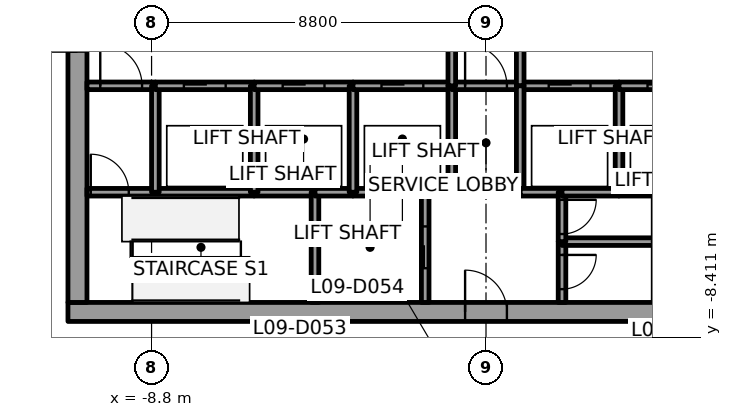
"""IFC4 building model, lengths in metres.
Left out: names, types, materials, properties, quantities, classifications, styles, units other than length and angle.
Written with IfcOpenShell. Run it as: python <this file> out.ifc"""

import sys

from ifc_helpers import new_model, si_unit, direction, frame, frame_2d, origin, place, context, subcontext, project, spatial, rectangle, extrude, element, fill, save


model = new_model("IFC4")
c1 = context("Model", 3, precision=1e-05, world=origin(), true_north=direction((0.0, 1.0)))
c2 = subcontext(c1, "Body", "Model", "MODEL_VIEW")
j1 = project(units=[si_unit("LENGTHUNIT", "METRE"), si_unit("PLANEANGLEUNIT", "RADIAN")], contexts=[c1])
p1 = place(None, origin())
s1 = spatial("IfcSite", under=j1, at=p1, CompositionType="ELEMENT")
p2 = place(p1, origin())
s2 = spatial("IfcBuilding", under=s1, at=p2, CompositionType="ELEMENT")
p3 = place(p2, frame((0.0, 0.0, 55.4)))
s3 = spatial("IfcBuildingStorey", under=s2, at=p3, CompositionType="ELEMENT", Elevation=55.4)
p4 = place(p3, frame((-11.0, -7.75, 0.0), z_axis=(0.0, 0.0, 1.0), x_axis=(1.0, 0.0, 0.0)))
e1 = element("IfcWall", 1, at=p4, inside=s3, PredefinedType="SHEAR", context=c2, shape_type="SweptSolid", body=[
    extrude(rectangle(XDim=22.0, YDim=0.5, at=frame_2d((11.0, 0.0))), origin(), (0.0, 0.0, 1.0), 3.7),
])
p5 = place(p4, frame((10.45, 0.0, 0.0)))
e2 = element("IfcOpeningElement", 2, at=p5, cuts=e1, PredefinedType="OPENING", context=c2, shape_type="SweptSolid", body=[
    extrude(rectangle(XDim=1.1, YDim=2.1, at=frame_2d((0.55, 1.05))), frame((0.0, 0.25, 0.0), z_axis=(0.0, -1.0, 0.0), x_axis=(1.0, 0.0, 0.0)), (0.0, 0.0, 1.0), 0.5),
])
p6 = place(p3, frame((-10.75, -7.5, 0.0), z_axis=(0.0, 0.0, 1.0), x_axis=(0.0, 1.0, 0.0)))
e3 = element("IfcWall", 3, at=p6, inside=s3, PredefinedType="SHEAR", context=c2, shape_type="SweptSolid", body=[
    extrude(rectangle(XDim=15.0, YDim=0.5, at=frame_2d((7.5, 0.0))), origin(), (0.0, 0.0, 1.0), 3.7),
])
p7 = place(p6, frame((6.6, 0.0, 0.0)))
e4 = element("IfcOpeningElement", 4, at=p7, cuts=e3, PredefinedType="OPENING", context=c2, shape_type="SweptSolid", body=[
    extrude(rectangle(XDim=1.8, YDim=2.1, at=frame_2d((0.9, 1.05))), frame((0.0, 0.25, 0.0), z_axis=(0.0, -1.0, 0.0), x_axis=(1.0, 0.0, 0.0)), (0.0, 0.0, 1.0), 0.5),
])
p8 = place(p3, frame((-10.5, -4.6, 0.0), z_axis=(0.0, 0.0, 1.0), x_axis=(1.0, 0.0, 0.0)))
e5 = element("IfcWall", 5, at=p8, inside=s3, PredefinedType="SOLIDWALL", context=c2, shape_type="SweptSolid", body=[
    extrude(rectangle(XDim=1.8, YDim=0.2, at=frame_2d((0.9, 0.0))), origin(), (0.0, 0.0, 1.0), 3.55),
])
p9 = place(p8, frame((0.1, 0.0, 0.0)))
e6 = element("IfcOpeningElement", 6, at=p9, cuts=e5, PredefinedType="OPENING", context=c2, shape_type="SweptSolid", body=[
    extrude(rectangle(XDim=1.0, YDim=2.1, at=frame_2d((0.5, 1.05))), frame((0.0, 0.1, 0.0), z_axis=(0.0, -1.0, 0.0), x_axis=(1.0, 0.0, 0.0)), (0.0, 0.0, 1.0), 0.2),
])
p10 = place(p3, frame((-10.5, -1.8, 0.0), z_axis=(0.0, 0.0, 1.0), x_axis=(1.0, 0.0, 0.0)))
e7 = element("IfcWall", 7, at=p10, inside=s3, PredefinedType="SOLIDWALL", context=c2, shape_type="SweptSolid", body=[
    extrude(rectangle(XDim=1.8, YDim=0.2, at=frame_2d((0.9, 0.0))), origin(), (0.0, 0.0, 1.0), 3.55),
])
p11 = place(p10, frame((0.35, 0.0, 0.0)))
e8 = element("IfcOpeningElement", 8, at=p11, cuts=e7, PredefinedType="OPENING", context=c2, shape_type="SweptSolid", body=[
    extrude(rectangle(XDim=1.1, YDim=2.1, at=frame_2d((0.55, 1.05))), frame((0.0, 0.1, 0.0), z_axis=(0.0, -1.0, 0.0), x_axis=(1.0, 0.0, 0.0)), (0.0, 0.0, 1.0), 0.2),
])
p12 = place(p3, frame((-8.7, -4.6, 0.0), z_axis=(0.0, 0.0, 1.0), x_axis=(1.0, 0.0, 0.0)))
e9 = element("IfcWall", 9, at=p12, inside=s3, PredefinedType="SOLIDWALL", context=c2, shape_type="SweptSolid", body=[
    extrude(rectangle(XDim=2.6, YDim=0.2, at=frame_2d((1.3, 0.0))), origin(), (0.0, 0.0, 1.0), 3.55),
])
p13 = place(p3, frame((-8.7, -4.6, 0.0), z_axis=(0.0, 0.0, 1.0), x_axis=(0.0, 1.0, 0.0)))
e10 = element("IfcWall", 10, at=p13, inside=s3, PredefinedType="SOLIDWALL", context=c2, shape_type="SweptSolid", body=[
    extrude(rectangle(XDim=2.8, YDim=0.2, at=frame_2d((1.4, 0.0))), origin(), (0.0, 0.0, 1.0), 3.55),
])
p14 = place(p3, frame((-8.7, -1.8, 0.0), z_axis=(0.0, 0.0, 1.0), x_axis=(1.0, 0.0, 0.0)))
e11 = element("IfcWall", 11, at=p14, inside=s3, PredefinedType="SOLIDWALL", context=c2, shape_type="SweptSolid", body=[
    extrude(rectangle(XDim=2.6, YDim=0.2, at=frame_2d((1.3, 0.0))), origin(), (0.0, 0.0, 1.0), 3.55),
])
p15 = place(p14, frame((0.75, 0.0, 0.0)))
e12 = element("IfcOpeningElement", 12, at=p15, cuts=e11, PredefinedType="OPENING", context=c2, shape_type="SweptSolid", body=[
    extrude(rectangle(XDim=1.1, YDim=2.1, at=frame_2d((0.55, 1.05))), frame((0.0, 0.1, 0.0), z_axis=(0.0, -1.0, 0.0), x_axis=(1.0, 0.0, 0.0)), (0.0, 0.0, 1.0), 0.2),
])
p16 = place(p3, frame((-6.1, -4.6, 0.0), z_axis=(0.0, 0.0, 1.0), x_axis=(1.0, 0.0, 0.0)))
e13 = element("IfcWall", 13, at=p16, inside=s3, PredefinedType="SOLIDWALL", context=c2, shape_type="SweptSolid", body=[
    extrude(rectangle(XDim=1.6, YDim=0.2, at=frame_2d((0.8, 0.0))), origin(), (0.0, 0.0, 1.0), 3.55),
])
p17 = place(p3, frame((-6.1, -4.6, 0.0), z_axis=(0.0, 0.0, 1.0), x_axis=(0.0, 1.0, 0.0)))
e14 = element("IfcWall", 14, at=p17, inside=s3, PredefinedType="SOLIDWALL", context=c2, shape_type="SweptSolid", body=[
    extrude(rectangle(XDim=2.8, YDim=0.2, at=frame_2d((1.4, 0.0))), origin(), (0.0, 0.0, 1.0), 3.55),
])
p18 = place(p3, frame((-6.1, -1.8, 0.0), z_axis=(0.0, 0.0, 1.0), x_axis=(1.0, 0.0, 0.0)))
e15 = element("IfcWall", 15, at=p18, inside=s3, PredefinedType="SOLIDWALL", context=c2, shape_type="SweptSolid", body=[
    extrude(rectangle(XDim=2.6, YDim=0.2, at=frame_2d((1.3, 0.0))), origin(), (0.0, 0.0, 1.0), 3.55),
])
p19 = place(p18, frame((0.75, 0.0, 0.0)))
e16 = element("IfcOpeningElement", 16, at=p19, cuts=e15, PredefinedType="OPENING", context=c2, shape_type="SweptSolid", body=[
    extrude(rectangle(XDim=1.1, YDim=2.1, at=frame_2d((0.55, 1.05))), frame((0.0, 0.1, 0.0), z_axis=(0.0, -1.0, 0.0), x_axis=(1.0, 0.0, 0.0)), (0.0, 0.0, 1.0), 0.2),
])
p20 = place(p3, frame((-4.5, -4.6, 0.0), z_axis=(0.0, 0.0, 1.0), x_axis=(0.0, -1.0, 0.0)))
e17 = element("IfcWall", 17, at=p20, inside=s3, PredefinedType="SOLIDWALL", context=c2, shape_type="SweptSolid", body=[
    extrude(rectangle(XDim=2.9, YDim=0.2, at=frame_2d((1.45, 0.0))), origin(), (0.0, 0.0, 1.0), 3.55),
])
p21 = place(p3, frame((-4.5, -4.6, 0.0), z_axis=(0.0, 0.0, 1.0), x_axis=(1.0, 0.0, 0.0)))
e18 = element("IfcWall", 18, at=p21, inside=s3, PredefinedType="SOLIDWALL", context=c2, shape_type="SweptSolid", body=[
    extrude(rectangle(XDim=1.0, YDim=0.2, at=frame_2d((0.5, 0.0))), origin(), (0.0, 0.0, 1.0), 3.55),
])
p22 = place(p3, frame((-3.5, -4.6, 0.0), z_axis=(0.0, 0.0, 1.0), x_axis=(1.0, 0.0, 0.0)))
e19 = element("IfcWall", 19, at=p22, inside=s3, PredefinedType="SOLIDWALL", context=c2, shape_type="SweptSolid", body=[
    extrude(rectangle(XDim=1.9, YDim=0.2, at=frame_2d((0.95, 0.0))), origin(), (0.0, 0.0, 1.0), 3.55),
])
p23 = place(p3, frame((-3.5, -4.6, 0.0), z_axis=(0.0, 0.0, 1.0), x_axis=(0.0, 1.0, 0.0)))
e20 = element("IfcWall", 20, at=p23, inside=s3, PredefinedType="SOLIDWALL", context=c2, shape_type="SweptSolid", body=[
    extrude(rectangle(XDim=2.8, YDim=0.2, at=frame_2d((1.4, 0.0))), origin(), (0.0, 0.0, 1.0), 3.55),
])
p24 = place(p3, frame((-3.5, -1.8, 0.0), z_axis=(0.0, 0.0, 1.0), x_axis=(1.0, 0.0, 0.0)))
e21 = element("IfcWall", 21, at=p24, inside=s3, PredefinedType="SOLIDWALL", context=c2, shape_type="SweptSolid", body=[
    extrude(rectangle(XDim=2.6, YDim=0.2, at=frame_2d((1.3, 0.0))), origin(), (0.0, 0.0, 1.0), 3.55),
])
p25 = place(p24, frame((0.75, 0.0, 0.0)))
e22 = element("IfcOpeningElement", 22, at=p25, cuts=e21, PredefinedType="OPENING", context=c2, shape_type="SweptSolid", body=[
    extrude(rectangle(XDim=1.1, YDim=2.1, at=frame_2d((0.55, 1.05))), frame((0.0, 0.1, 0.0), z_axis=(0.0, -1.0, 0.0), x_axis=(1.0, 0.0, 0.0)), (0.0, 0.0, 1.0), 0.2),
])
p26 = place(p3, frame((-1.6, -7.5, 0.0), z_axis=(0.0, 0.0, 1.0), x_axis=(0.0, 1.0, 0.0)))
e23 = element("IfcWall", 23, at=p26, inside=s3, PredefinedType="SOLIDWALL", context=c2, shape_type="SweptSolid", body=[
    extrude(rectangle(XDim=2.9, YDim=0.2, at=frame_2d((1.45, 0.0))), origin(), (0.0, 0.0, 1.0), 3.55),
])
p27 = place(p26, frame((0.9, 0.0, 0.0)))
e24 = element("IfcOpeningElement", 24, at=p27, cuts=e23, PredefinedType="OPENING", context=c2, shape_type="SweptSolid", body=[
    extrude(rectangle(XDim=1.1, YDim=2.1, at=frame_2d((0.55, 1.05))), frame((0.0, 0.1, 0.0), z_axis=(0.0, -1.0, 0.0), x_axis=(1.0, 0.0, 0.0)), (0.0, 0.0, 1.0), 0.2),
])
p28 = place(p3, frame((-1.6, -4.6, 0.0), z_axis=(0.0, 0.0, 1.0), x_axis=(1.0, 0.0, 0.0)))
e25 = element("IfcWall", 25, at=p28, inside=s3, PredefinedType="SOLIDWALL", context=c2, shape_type="SweptSolid", body=[
    extrude(rectangle(XDim=0.7, YDim=0.2, at=frame_2d((0.35, 0.0))), origin(), (0.0, 0.0, 1.0), 3.55),
])
p29 = place(p3, frame((-0.9, -4.6, 0.0), z_axis=(0.0, 0.0, 1.0), x_axis=(0.0, 1.0, 0.0)))
e26 = element("IfcWall", 26, at=p29, inside=s3, PredefinedType="SOLIDWALL", context=c2, shape_type="SweptSolid", body=[
    extrude(rectangle(XDim=2.8, YDim=0.2, at=frame_2d((1.4, 0.0))), origin(), (0.0, 0.0, 1.0), 3.55),
])
p30 = place(p3, frame((-0.9, -1.8, 0.0), z_axis=(0.0, 0.0, 1.0), x_axis=(1.0, 0.0, 0.0)))
e27 = element("IfcWall", 27, at=p30, inside=s3, PredefinedType="SOLIDWALL", context=c2, shape_type="SweptSolid", body=[
    extrude(rectangle(XDim=1.8, YDim=0.2, at=frame_2d((0.9, 0.0))), origin(), (0.0, 0.0, 1.0), 3.55),
])
p31 = place(p30, frame((0.35, 0.0, 0.0)))
e28 = element("IfcOpeningElement", 28, at=p31, cuts=e27, PredefinedType="OPENING", context=c2, shape_type="SweptSolid", body=[
    extrude(rectangle(XDim=1.1, YDim=2.1, at=frame_2d((0.55, 1.05))), frame((0.0, 0.1, 0.0), z_axis=(0.0, -1.0, 0.0), x_axis=(1.0, 0.0, 0.0)), (0.0, 0.0, 1.0), 0.2),
])
p32 = place(p3, frame((-0.9, 1.8, 0.0), z_axis=(0.0, 0.0, 1.0), x_axis=(0.0, -1.0, 0.0)))
e29 = element("IfcWall", 29, at=p32, inside=s3, PredefinedType="SOLIDWALL", context=c2, shape_type="SweptSolid", body=[
    extrude(rectangle(XDim=3.6, YDim=0.2, at=frame_2d((1.8, 0.0))), origin(), (0.0, 0.0, 1.0), 3.55),
])
p33 = place(p32, frame((1.05, 0.0, 0.0)))
e30 = element("IfcOpeningElement", 30, at=p33, cuts=e29, PredefinedType="OPENING", context=c2, shape_type="SweptSolid", body=[
    extrude(rectangle(XDim=1.5, YDim=2.1, at=frame_2d((0.75, 1.05))), frame((0.0, 0.1, 0.0), z_axis=(0.0, -1.0, 0.0), x_axis=(1.0, 0.0, 0.0)), (0.0, 0.0, 1.0), 0.2),
])
p34 = place(p3, frame((0.9, -1.8, 0.0), z_axis=(0.0, 0.0, 1.0), x_axis=(1.0, 0.0, 0.0)))
e31 = element("IfcWall", 31, at=p34, inside=s3, PredefinedType="SOLIDWALL", context=c2, shape_type="SweptSolid", body=[
    extrude(rectangle(XDim=2.6, YDim=0.2, at=frame_2d((1.3, 0.0))), origin(), (0.0, 0.0, 1.0), 3.55),
])
p35 = place(p34, frame((0.75, 0.0, 0.0)))
e32 = element("IfcOpeningElement", 32, at=p35, cuts=e31, PredefinedType="OPENING", context=c2, shape_type="SweptSolid", body=[
    extrude(rectangle(XDim=1.1, YDim=2.1, at=frame_2d((0.55, 1.05))), frame((0.0, 0.1, 0.0), z_axis=(0.0, -1.0, 0.0), x_axis=(1.0, 0.0, 0.0)), (0.0, 0.0, 1.0), 0.2),
])
p36 = place(p3, frame((0.9, -1.8, 0.0), z_axis=(0.0, 0.0, 1.0), x_axis=(0.0, 1.0, 0.0)))
e33 = element("IfcWall", 33, at=p36, inside=s3, PredefinedType="SOLIDWALL", context=c2, shape_type="SweptSolid", body=[
    extrude(rectangle(XDim=3.6, YDim=0.2, at=frame_2d((1.8, 0.0))), origin(), (0.0, 0.0, 1.0), 3.55),
])
p37 = place(p36, frame((1.05, 0.0, 0.0)))
e34 = element("IfcOpeningElement", 34, at=p37, cuts=e33, PredefinedType="OPENING", context=c2, shape_type="SweptSolid", body=[
    extrude(rectangle(XDim=1.5, YDim=2.1, at=frame_2d((0.75, 1.05))), frame((0.0, 0.1, 0.0), z_axis=(0.0, -1.0, 0.0), x_axis=(1.0, 0.0, 0.0)), (0.0, 0.0, 1.0), 0.2),
])
p38 = place(p3, frame((0.9, -1.8, 0.0), z_axis=(0.0, 0.0, 1.0), x_axis=(0.0, -1.0, 0.0)))
e35 = element("IfcWall", 35, at=p38, inside=s3, PredefinedType="SOLIDWALL", context=c2, shape_type="SweptSolid", body=[
    extrude(rectangle(XDim=2.8, YDim=0.2, at=frame_2d((1.4, 0.0))), origin(), (0.0, 0.0, 1.0), 3.55),
])
p39 = place(p3, frame((0.9, -4.6, 0.0), z_axis=(0.0, 0.0, 1.0), x_axis=(1.0, 0.0, 0.0)))
e36 = element("IfcWall", 36, at=p39, inside=s3, PredefinedType="SOLIDWALL", context=c2, shape_type="SweptSolid", body=[
    extrude(rectangle(XDim=1.1, YDim=0.2, at=frame_2d((0.55, 0.0))), origin(), (0.0, 0.0, 1.0), 3.55),
])
p40 = place(p3, frame((2.0, -5.9, 0.0), z_axis=(0.0, 0.0, 1.0), x_axis=(0.0, -1.0, 0.0)))
e37 = element("IfcWall", 37, at=p40, inside=s3, PredefinedType="SOLIDWALL", context=c2, shape_type="SweptSolid", body=[
    extrude(rectangle(XDim=1.6, YDim=0.2, at=frame_2d((0.8, 0.0))), origin(), (0.0, 0.0, 1.0), 3.55),
])
p41 = place(p40, frame((0.35, 0.0, 0.0)))
e38 = element("IfcOpeningElement", 38, at=p41, cuts=e37, PredefinedType="OPENING", context=c2, shape_type="SweptSolid", body=[
    extrude(rectangle(XDim=0.9, YDim=2.1, at=frame_2d((0.45, 1.05))), frame((0.0, 0.1, 0.0), z_axis=(0.0, -1.0, 0.0), x_axis=(1.0, 0.0, 0.0)), (0.0, 0.0, 1.0), 0.2),
])
p42 = place(p3, frame((4.5, -5.9, 0.0), z_axis=(0.0, 0.0, 1.0), x_axis=(-1.0, 0.0, 0.0)))
e39 = element("IfcWall", 39, at=p42, inside=s3, PredefinedType="SOLIDWALL", context=c2, shape_type="SweptSolid", body=[
    extrude(rectangle(XDim=2.5, YDim=0.2, at=frame_2d((1.25, 0.0))), origin(), (0.0, 0.0, 1.0), 3.55),
])
p43 = place(p3, frame((2.0, -4.6, 0.0), z_axis=(0.0, 0.0, 1.0), x_axis=(0.0, -1.0, 0.0)))
e40 = element("IfcWall", 40, at=p43, inside=s3, PredefinedType="SOLIDWALL", context=c2, shape_type="SweptSolid", body=[
    extrude(rectangle(XDim=1.3, YDim=0.2, at=frame_2d((0.65, 0.0))), origin(), (0.0, 0.0, 1.0), 3.55),
])
p44 = place(p43, frame((0.2, 0.0, 0.0)))
e41 = element("IfcOpeningElement", 41, at=p44, cuts=e40, PredefinedType="OPENING", context=c2, shape_type="SweptSolid", body=[
    extrude(rectangle(XDim=0.9, YDim=2.1, at=frame_2d((0.45, 1.05))), frame((0.0, 0.1, 0.0), z_axis=(0.0, -1.0, 0.0), x_axis=(1.0, 0.0, 0.0)), (0.0, 0.0, 1.0), 0.2),
])
p45 = place(p3, frame((3.5, -4.6, 0.0), z_axis=(0.0, 0.0, 1.0), x_axis=(-1.0, 0.0, 0.0)))
e42 = element("IfcWall", 42, at=p45, inside=s3, PredefinedType="SOLIDWALL", context=c2, shape_type="SweptSolid", body=[
    extrude(rectangle(XDim=1.5, YDim=0.2, at=frame_2d((0.75, 0.0))), origin(), (0.0, 0.0, 1.0), 3.55),
])
p46 = place(p3, frame((4.5, -4.6, 0.0), z_axis=(0.0, 0.0, 1.0), x_axis=(-1.0, 0.0, 0.0)))
e43 = element("IfcWall", 43, at=p46, inside=s3, PredefinedType="SOLIDWALL", context=c2, shape_type="SweptSolid", body=[
    extrude(rectangle(XDim=1.0, YDim=0.2, at=frame_2d((0.5, 0.0))), origin(), (0.0, 0.0, 1.0), 3.55),
])
p47 = place(p3, frame((3.5, -4.6, 0.0), z_axis=(0.0, 0.0, 1.0), x_axis=(0.0, 1.0, 0.0)))
e44 = element("IfcWall", 44, at=p47, inside=s3, PredefinedType="SOLIDWALL", context=c2, shape_type="SweptSolid", body=[
    extrude(rectangle(XDim=2.8, YDim=0.2, at=frame_2d((1.4, 0.0))), origin(), (0.0, 0.0, 1.0), 3.55),
])
p48 = place(p3, frame((3.5, -1.8, 0.0), z_axis=(0.0, 0.0, 1.0), x_axis=(1.0, 0.0, 0.0)))
e45 = element("IfcWall", 45, at=p48, inside=s3, PredefinedType="SOLIDWALL", context=c2, shape_type="SweptSolid", body=[
    extrude(rectangle(XDim=2.6, YDim=0.2, at=frame_2d((1.3, 0.0))), origin(), (0.0, 0.0, 1.0), 3.55),
])
p49 = place(p48, frame((0.75, 0.0, 0.0)))
e46 = element("IfcOpeningElement", 46, at=p49, cuts=e45, PredefinedType="OPENING", context=c2, shape_type="SweptSolid", body=[
    extrude(rectangle(XDim=1.1, YDim=2.1, at=frame_2d((0.55, 1.05))), frame((0.0, 0.1, 0.0), z_axis=(0.0, -1.0, 0.0), x_axis=(1.0, 0.0, 0.0)), (0.0, 0.0, 1.0), 0.2),
])
p50 = place(p15, origin())
e47 = element("IfcDoor", 47, at=p50, inside=s3, OperationType="SLIDING_TO_LEFT", PredefinedType="DOOR", context=c2, shape_type="SweptSolid", body=[
    extrude(rectangle(XDim=1.1, YDim=2.1, at=frame_2d((0.55, 1.05))), frame((0.0, 0.025, 0.0), z_axis=(0.0, -1.0, 0.0), x_axis=(1.0, 0.0, 0.0)), (0.0, 0.0, 1.0), 0.05),
])
fill(e12, e47)
p51 = place(p19, origin())
e48 = element("IfcDoor", 48, at=p51, inside=s3, OperationType="SLIDING_TO_RIGHT", PredefinedType="DOOR", context=c2, shape_type="SweptSolid", body=[
    extrude(rectangle(XDim=1.1, YDim=2.1, at=frame_2d((0.55, 1.05))), frame((0.0, 0.025, 0.0), z_axis=(0.0, -1.0, 0.0), x_axis=(1.0, 0.0, 0.0)), (0.0, 0.0, 1.0), 0.05),
])
fill(e16, e48)
p52 = place(p25, origin())
e49 = element("IfcDoor", 49, at=p52, inside=s3, OperationType="SLIDING_TO_RIGHT", PredefinedType="DOOR", context=c2, shape_type="SweptSolid", body=[
    extrude(rectangle(XDim=1.1, YDim=2.1, at=frame_2d((0.55, 1.05))), frame((0.0, 0.025, 0.0), z_axis=(0.0, -1.0, 0.0), x_axis=(1.0, 0.0, 0.0)), (0.0, 0.0, 1.0), 0.05),
])
fill(e22, e49)
p53 = place(p35, origin())
e50 = element("IfcDoor", 50, at=p53, inside=s3, OperationType="SLIDING_TO_RIGHT", PredefinedType="DOOR", context=c2, shape_type="SweptSolid", body=[
    extrude(rectangle(XDim=1.1, YDim=2.1, at=frame_2d((0.55, 1.05))), frame((0.0, 0.025, 0.0), z_axis=(0.0, -1.0, 0.0), x_axis=(1.0, 0.0, 0.0)), (0.0, 0.0, 1.0), 0.05),
])
fill(e32, e50)
p54 = place(p49, origin())
e51 = element("IfcDoor", 51, at=p54, inside=s3, OperationType="SLIDING_TO_RIGHT", PredefinedType="DOOR", context=c2, shape_type="SweptSolid", body=[
    extrude(rectangle(XDim=1.1, YDim=2.1, at=frame_2d((0.55, 1.05))), frame((0.0, 0.025, 0.0), z_axis=(0.0, -1.0, 0.0), x_axis=(1.0, 0.0, 0.0)), (0.0, 0.0, 1.0), 0.05),
])
fill(e46, e51)
p55 = place(p27, origin())
e52 = element("IfcDoor", 52, at=p55, inside=s3, OperationType="SLIDING_TO_RIGHT", PredefinedType="DOOR", context=c2, shape_type="SweptSolid", body=[
    extrude(rectangle(XDim=1.1, YDim=2.1, at=frame_2d((0.55, 1.05))), frame((0.0, 0.025, 0.0), z_axis=(0.0, -1.0, 0.0), x_axis=(1.0, 0.0, 0.0)), (0.0, 0.0, 1.0), 0.05),
])
fill(e24, e52)
p56 = place(p11, origin())
e53 = element("IfcDoor", 53, at=p56, inside=s3, OperationType="SINGLE_SWING_RIGHT", PredefinedType="DOOR", context=c2, shape_type="SweptSolid", body=[
    extrude(rectangle(XDim=1.1, YDim=2.1, at=frame_2d((0.55, 1.05))), frame((0.0, 0.025, 0.0), z_axis=(0.0, -1.0, 0.0), x_axis=(1.0, 0.0, 0.0)), (0.0, 0.0, 1.0), 0.05),
])
fill(e8, e53)
p57 = place(p31, origin())
e54 = element("IfcDoor", 54, at=p57, inside=s3, OperationType="SINGLE_SWING_RIGHT", PredefinedType="DOOR", context=c2, shape_type="SweptSolid", body=[
    extrude(rectangle(XDim=1.1, YDim=2.1, at=frame_2d((0.55, 1.05))), frame((0.0, 0.025, 0.0), z_axis=(0.0, -1.0, 0.0), x_axis=(1.0, 0.0, 0.0)), (0.0, 0.0, 1.0), 0.05),
])
fill(e28, e54)
p58 = place(p9, origin())
e55 = element("IfcDoor", 55, at=p58, inside=s3, OperationType="SINGLE_SWING_LEFT", PredefinedType="DOOR", context=c2, shape_type="SweptSolid", body=[
    extrude(rectangle(XDim=1.0, YDim=2.1, at=frame_2d((0.5, 1.05))), frame((0.0, 0.025, 0.0), z_axis=(0.0, -1.0, 0.0), x_axis=(1.0, 0.0, 0.0)), (0.0, 0.0, 1.0), 0.05),
])
fill(e6, e55)
p59 = place(p41, origin())
e56 = element("IfcDoor", 56, at=p59, inside=s3, OperationType="SINGLE_SWING_LEFT", PredefinedType="DOOR", context=c2, shape_type="SweptSolid", body=[
    extrude(rectangle(XDim=0.9, YDim=2.1, at=frame_2d((0.45, 1.05))), frame((0.0, 0.025, 0.0), z_axis=(0.0, -1.0, 0.0), x_axis=(1.0, 0.0, 0.0)), (0.0, 0.0, 1.0), 0.05),
])
fill(e38, e56)
p60 = place(p44, origin())
e57 = element("IfcDoor", 57, at=p60, inside=s3, OperationType="SINGLE_SWING_RIGHT", PredefinedType="DOOR", context=c2, shape_type="SweptSolid", body=[
    extrude(rectangle(XDim=0.9, YDim=2.1, at=frame_2d((0.45, 1.05))), frame((0.0, 0.025, 0.0), z_axis=(0.0, -1.0, 0.0), x_axis=(1.0, 0.0, 0.0)), (0.0, 0.0, 1.0), 0.05),
])
fill(e41, e57)
p61 = place(p7, origin())
e58 = element("IfcDoor", 58, at=p61, inside=s3, OperationType="DOUBLE_DOOR_SINGLE_SWING", PredefinedType="DOOR", context=c2, shape_type="SweptSolid", body=[
    extrude(rectangle(XDim=1.8, YDim=2.1, at=frame_2d((0.9, 1.05))), frame((0.0, 0.025, 0.0), z_axis=(0.0, -1.0, 0.0), x_axis=(1.0, 0.0, 0.0)), (0.0, 0.0, 1.0), 0.05),
])
fill(e4, e58)
p62 = place(p5, origin())
e59 = element("IfcDoor", 59, at=p62, inside=s3, OperationType="SINGLE_SWING_LEFT", PredefinedType="DOOR", context=c2, shape_type="SweptSolid", body=[
    extrude(rectangle(XDim=1.1, YDim=2.1, at=frame_2d((0.55, 1.05))), frame((0.0, 0.025, 0.0), z_axis=(0.0, -1.0, 0.0), x_axis=(1.0, 0.0, 0.0)), (0.0, 0.0, 1.0), 0.05),
])
fill(e2, e59)
save(model, sys.argv[1])
